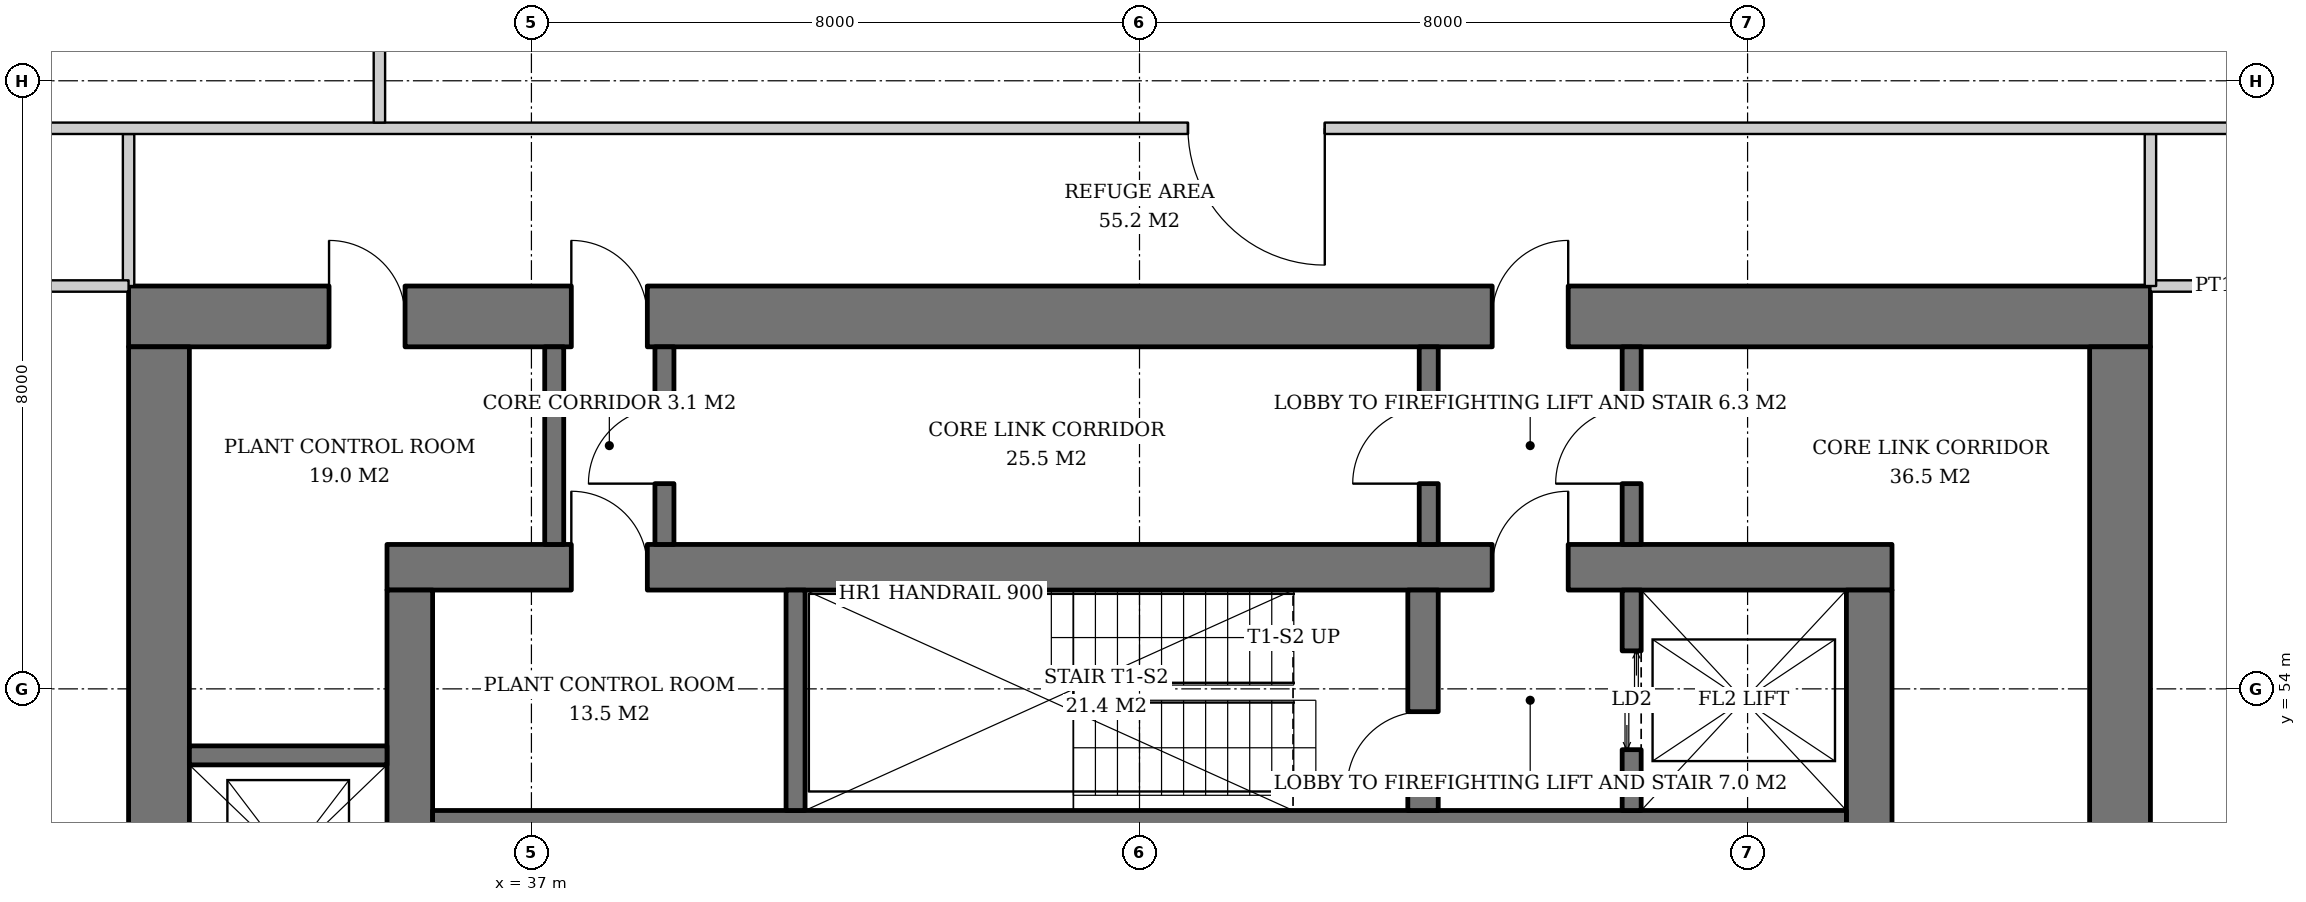
"""IFC4 building model, lengths in metres.
Left out: names, types, materials, properties, quantities, classifications, styles, units other than length and angle.
Written with IfcOpenShell. Run it as: python <this file> out.ifc"""

import sys

from ifc_helpers import new_model, si_unit, direction, frame, frame_2d, origin, place, context, subcontext, project, spatial, rectangle, extrude, element, fill, save


model = new_model("IFC4")
c1 = context("Model", 3, precision=1e-05, world=origin(), true_north=direction((0.0, 1.0)))
c2 = subcontext(c1, "Body", "Model", "MODEL_VIEW")
j1 = project(units=[si_unit("LENGTHUNIT", "METRE"), si_unit("PLANEANGLEUNIT", "RADIAN")], contexts=[c1])
p1 = place(None, origin())
s1 = spatial("IfcSite", under=j1, at=p1, CompositionType="ELEMENT")
p2 = place(p1, origin())
s2 = spatial("IfcBuilding", under=s1, at=p2, CompositionType="ELEMENT")
p3 = place(p2, frame((0.0, 0.0, 85.6)))
s3 = spatial("IfcBuildingStorey", under=s2, at=p3, CompositionType="ELEMENT", Elevation=85.6)
p4 = place(p3, frame((35.1, 55.6, 0.0), z_axis=(0.0, 0.0, 1.0), x_axis=(1.0, 0.0, 0.0)))
e1 = element("IfcWall", 1, at=p4, inside=s3, PredefinedType="SHEAR", context=c2, shape_type="SweptSolid", body=[
    extrude(rectangle(XDim=19.8, YDim=0.6, at=frame_2d((9.9, 0.0))), origin(), (0.0, 0.0, 1.0), 3.8),
])
p5 = place(p4, frame((14.54, 0.0, 0.0)))
e2 = element("IfcOpeningElement", 2, at=p5, cuts=e1, PredefinedType="OPENING", context=c2, shape_type="SweptSolid", body=[
    extrude(rectangle(XDim=1.0, YDim=2.1, at=frame_2d((0.5, 1.05))), frame((0.0, 0.31, 0.0), z_axis=(0.0, -1.0, 0.0), x_axis=(1.0, 0.0, 0.0)), (0.0, 0.0, 1.0), 0.62),
])
p6 = place(p4, frame((2.425, 0.0, 0.0)))
e3 = element("IfcOpeningElement", 3, at=p6, cuts=e1, PredefinedType="OPENING", context=c2, shape_type="SweptSolid", body=[
    extrude(rectangle(XDim=1.0, YDim=2.1, at=frame_2d((0.5, 1.05))), frame((0.0, 0.31, 0.0), z_axis=(0.0, -1.0, 0.0), x_axis=(1.0, 0.0, 0.0)), (0.0, 0.0, 1.0), 0.62),
])
p7 = place(p3, frame((35.4, 36.7, 0.0), z_axis=(0.0, 0.0, 1.0), x_axis=(0.0, 1.0, 0.0)))
e4 = element("IfcWall", 4, at=p7, inside=s3, PredefinedType="SHEAR", context=c2, shape_type="SweptSolid", body=[
    extrude(rectangle(XDim=18.6, YDim=0.6, at=frame_2d((9.3, 0.0))), origin(), (0.0, 0.0, 1.0), 3.8),
])
p8 = place(p7, frame((8.4, 0.0, 0.0)))
e5 = element("IfcOpeningElement", 5, at=p8, cuts=e4, PredefinedType="OPENING", context=c2, shape_type="SweptSolid", body=[
    extrude(rectangle(XDim=1.8, YDim=2.4, at=frame_2d((0.9, 1.2))), frame((0.0, 0.31, 0.0), z_axis=(0.0, -1.0, 0.0), x_axis=(1.0, 0.0, 0.0)), (0.0, 0.0, 1.0), 0.62),
])
p9 = place(p3, frame((54.6, 36.7, 0.0), z_axis=(0.0, 0.0, 1.0), x_axis=(0.0, 1.0, 0.0)))
e6 = element("IfcWall", 6, at=p9, inside=s3, PredefinedType="SHEAR", context=c2, shape_type="SweptSolid", body=[
    extrude(rectangle(XDim=18.6, YDim=0.6, at=frame_2d((9.3, 0.0))), origin(), (0.0, 0.0, 1.0), 3.8),
])
p10 = place(p9, frame((8.4, 0.0, 0.0)))
e7 = element("IfcOpeningElement", 7, at=p10, cuts=e6, PredefinedType="OPENING", context=c2, shape_type="SweptSolid", body=[
    extrude(rectangle(XDim=1.8, YDim=2.4, at=frame_2d((0.9, 1.2))), frame((0.0, 0.31, 0.0), z_axis=(0.0, -1.0, 0.0), x_axis=(1.0, 0.0, 0.0)), (0.0, 0.0, 1.0), 0.62),
])
p11 = place(p3, frame((31.7, 58.9, 0.0), z_axis=(0.0, 0.0, 1.0), x_axis=(1.0, 0.0, 0.0)))
e8 = element("IfcWall", 8, at=p11, inside=s3, PredefinedType="SHEAR", context=c2, shape_type="SweptSolid", body=[
    extrude(rectangle(XDim=26.6, YDim=0.8, at=frame_2d((13.3, 0.0))), origin(), (0.0, 0.0, 1.0), 3.8),
])
p12 = place(p11, frame((17.94, 0.0, 0.0)))
e9 = element("IfcOpeningElement", 9, at=p12, cuts=e8, PredefinedType="OPENING", context=c2, shape_type="SweptSolid", body=[
    extrude(rectangle(XDim=1.0, YDim=2.1, at=frame_2d((0.5, 1.05))), frame((0.0, 0.41, 0.0), z_axis=(0.0, -1.0, 0.0), x_axis=(1.0, 0.0, 0.0)), (0.0, 0.0, 1.0), 0.82),
])
p13 = place(p11, frame((5.825, 0.0, 0.0)))
e10 = element("IfcOpeningElement", 10, at=p13, cuts=e8, PredefinedType="OPENING", context=c2, shape_type="SweptSolid", body=[
    extrude(rectangle(XDim=1.0, YDim=2.1, at=frame_2d((0.5, 1.05))), frame((0.0, 0.41, 0.0), z_axis=(0.0, -1.0, 0.0), x_axis=(1.0, 0.0, 0.0)), (0.0, 0.0, 1.0), 0.82),
])
p14 = place(p11, frame((2.637, 0.0, 0.0)))
e11 = element("IfcOpeningElement", 11, at=p14, cuts=e8, PredefinedType="OPENING", context=c2, shape_type="SweptSolid", body=[
    extrude(rectangle(XDim=1.0, YDim=2.1, at=frame_2d((0.5, 1.05))), frame((0.0, 0.41, 0.0), z_axis=(0.0, -1.0, 0.0), x_axis=(1.0, 0.0, 0.0)), (0.0, 0.0, 1.0), 0.82),
])
p15 = place(p3, frame((32.1, 33.5, 0.0), z_axis=(0.0, 0.0, 1.0), x_axis=(0.0, 1.0, 0.0)))
e12 = element("IfcWall", 12, at=p15, inside=s3, PredefinedType="SHEAR", context=c2, shape_type="SweptSolid", body=[
    extrude(rectangle(XDim=25.0, YDim=0.8, at=frame_2d((12.5, 0.0))), origin(), (0.0, 0.0, 1.0), 3.8),
])
p16 = place(p15, frame((11.6, 0.0, 0.0)))
e13 = element("IfcOpeningElement", 13, at=p16, cuts=e12, PredefinedType="OPENING", context=c2, shape_type="SweptSolid", body=[
    extrude(rectangle(XDim=1.8, YDim=2.4, at=frame_2d((0.9, 1.2))), frame((0.0, 0.41, 0.0), z_axis=(0.0, -1.0, 0.0), x_axis=(1.0, 0.0, 0.0)), (0.0, 0.0, 1.0), 0.82),
])
p17 = place(p3, frame((57.9, 33.5, 0.0), z_axis=(0.0, 0.0, 1.0), x_axis=(0.0, 1.0, 0.0)))
e14 = element("IfcWall", 14, at=p17, inside=s3, PredefinedType="SHEAR", context=c2, shape_type="SweptSolid", body=[
    extrude(rectangle(XDim=25.0, YDim=0.8, at=frame_2d((12.5, 0.0))), origin(), (0.0, 0.0, 1.0), 3.8),
])
p18 = place(p17, frame((11.6, 0.0, 0.0)))
e15 = element("IfcOpeningElement", 15, at=p18, cuts=e14, PredefinedType="OPENING", context=c2, shape_type="SweptSolid", body=[
    extrude(rectangle(XDim=1.8, YDim=2.4, at=frame_2d((0.9, 1.2))), frame((0.0, 0.41, 0.0), z_axis=(0.0, -1.0, 0.0), x_axis=(1.0, 0.0, 0.0)), (0.0, 0.0, 1.0), 0.82),
])
p19 = place(p3, frame((35.7, 52.2, 0.0), z_axis=(0.0, 0.0, 1.0), x_axis=(1.0, 0.0, 0.0)))
e16 = element("IfcWall", 16, at=p19, inside=s3, PredefinedType="SHEAR", context=c2, shape_type="SweptSolid", body=[
    extrude(rectangle(XDim=18.6, YDim=0.4, at=frame_2d((9.3, 0.0))), origin(), (0.0, 0.0, 1.0), 3.8),
])
p20 = place(p3, frame((48.73, 52.4, 0.0), z_axis=(0.0, 0.0, 1.0), x_axis=(0.0, 1.0, 0.0)))
e17 = element("IfcWall", 17, at=p20, inside=s3, PredefinedType="SHEAR", context=c2, shape_type="SweptSolid", body=[
    extrude(rectangle(XDim=2.9, YDim=0.4, at=frame_2d((1.45, 0.0))), origin(), (0.0, 0.0, 1.0), 3.8),
])
p21 = place(p20, frame((0.3, 0.0, 0.0)))
e18 = element("IfcOpeningElement", 18, at=p21, cuts=e17, PredefinedType="OPENING", context=c2, shape_type="SweptSolid", body=[
    extrude(rectangle(XDim=1.0, YDim=2.1, at=frame_2d((0.5, 1.05))), frame((0.0, 0.21, 0.0), z_axis=(0.0, -1.0, 0.0), x_axis=(1.0, 0.0, 0.0)), (0.0, 0.0, 1.0), 0.42),
])
p22 = place(p3, frame((40.475, 52.4, 0.0), z_axis=(0.0, 0.0, 1.0), x_axis=(0.0, 1.0, 0.0)))
e19 = element("IfcWall", 19, at=p22, inside=s3, PredefinedType="SHEAR", context=c2, shape_type="SweptSolid", body=[
    extrude(rectangle(XDim=2.9, YDim=0.25, at=frame_2d((1.45, 0.0))), origin(), (0.0, 0.0, 1.0), 3.8),
])
p23 = place(p3, frame((51.475, 52.4, 0.0), z_axis=(0.0, 0.0, 1.0), x_axis=(0.0, 1.0, 0.0)))
e20 = element("IfcWall", 20, at=p23, inside=s3, PredefinedType="SHEAR", context=c2, shape_type="SweptSolid", body=[
    extrude(rectangle(XDim=2.9, YDim=0.25, at=frame_2d((1.45, 0.0))), origin(), (0.0, 0.0, 1.0), 3.8),
])
p24 = place(p23, frame((0.8, 0.0, 0.0)))
e21 = element("IfcOpeningElement", 21, at=p24, cuts=e20, PredefinedType="OPENING", context=c2, shape_type="SweptSolid", body=[
    extrude(rectangle(XDim=1.3, YDim=2.2, at=frame_2d((0.65, 1.1))), frame((0.0, 0.135, 0.0), z_axis=(0.0, -1.0, 0.0), x_axis=(1.0, 0.0, 0.0)), (0.0, 0.0, 1.0), 0.27),
])
p25 = place(p3, frame((32.5, 53.125, 0.0), z_axis=(0.0, 0.0, 1.0), x_axis=(1.0, 0.0, 0.0)))
e22 = element("IfcWall", 22, at=p25, inside=s3, PredefinedType="SHEAR", context=c2, shape_type="SweptSolid", body=[
    extrude(rectangle(XDim=2.6, YDim=0.25, at=frame_2d((1.3, 0.0))), origin(), (0.0, 0.0, 1.0), 3.8),
])
p26 = place(p3, frame((48.805, 55.9, 0.0), z_axis=(0.0, 0.0, 1.0), x_axis=(0.0, 1.0, 0.0)))
e23 = element("IfcWall", 23, at=p26, inside=s3, PredefinedType="SOLIDWALL", context=c2, shape_type="SweptSolid", body=[
    extrude(rectangle(XDim=2.6, YDim=0.25, at=frame_2d((1.3, 0.0))), origin(), (0.0, 0.0, 1.0), 3.6),
])
p27 = place(p26, frame((0.8, 0.0, 0.0)))
e24 = element("IfcOpeningElement", 24, at=p27, cuts=e23, PredefinedType="OPENING", context=c2, shape_type="SweptSolid", body=[
    extrude(rectangle(XDim=1.0, YDim=2.1, at=frame_2d((0.5, 1.05))), frame((0.0, 0.135, 0.0), z_axis=(0.0, -1.0, 0.0), x_axis=(1.0, 0.0, 0.0)), (0.0, 0.0, 1.0), 0.27),
])
p28 = place(p3, frame((51.475, 55.9, 0.0), z_axis=(0.0, 0.0, 1.0), x_axis=(0.0, 1.0, 0.0)))
e25 = element("IfcWall", 25, at=p28, inside=s3, PredefinedType="SOLIDWALL", context=c2, shape_type="SweptSolid", body=[
    extrude(rectangle(XDim=2.6, YDim=0.25, at=frame_2d((1.3, 0.0))), origin(), (0.0, 0.0, 1.0), 3.6),
])
p29 = place(p28, frame((0.8, 0.0, 0.0)))
e26 = element("IfcOpeningElement", 26, at=p29, cuts=e25, PredefinedType="OPENING", context=c2, shape_type="SweptSolid", body=[
    extrude(rectangle(XDim=1.0, YDim=2.1, at=frame_2d((0.5, 1.05))), frame((0.0, 0.135, 0.0), z_axis=(0.0, -1.0, 0.0), x_axis=(1.0, 0.0, 0.0)), (0.0, 0.0, 1.0), 0.27),
])
p30 = place(p3, frame((37.3, 55.9, 0.0), z_axis=(0.0, 0.0, 1.0), x_axis=(0.0, 1.0, 0.0)))
e27 = element("IfcWall", 27, at=p30, inside=s3, PredefinedType="SOLIDWALL", context=c2, shape_type="SweptSolid", body=[
    extrude(rectangle(XDim=2.6, YDim=0.25, at=frame_2d((1.3, 0.0))), origin(), (0.0, 0.0, 1.0), 3.6),
])
p31 = place(p3, frame((38.75, 55.9, 0.0), z_axis=(0.0, 0.0, 1.0), x_axis=(0.0, 1.0, 0.0)))
e28 = element("IfcWall", 28, at=p31, inside=s3, PredefinedType="SOLIDWALL", context=c2, shape_type="SweptSolid", body=[
    extrude(rectangle(XDim=2.6, YDim=0.25, at=frame_2d((1.3, 0.0))), origin(), (0.0, 0.0, 1.0), 3.6),
])
p32 = place(p31, frame((0.8, 0.0, 0.0)))
e29 = element("IfcOpeningElement", 29, at=p32, cuts=e28, PredefinedType="OPENING", context=c2, shape_type="SweptSolid", body=[
    extrude(rectangle(XDim=1.0, YDim=2.1, at=frame_2d((0.5, 1.05))), frame((0.0, 0.135, 0.0), z_axis=(0.0, -1.0, 0.0), x_axis=(1.0, 0.0, 0.0)), (0.0, 0.0, 1.0), 0.27),
])
for number, where, z_axis, x_axis in (
    (30, (58.3, 59.3, 0.0), (0.0, 0.0, 1.0), (1.0, 0.0, 0.0)),
    (31, (31.7, 59.3, 0.0), (0.0, 0.0, 1.0), (0.0, 1.0, 0.0)),
):
    element("IfcWall", number, at=place(p3, frame(where, z_axis=z_axis, x_axis=x_axis)), inside=s3, PredefinedType="PARTITIONING", context=c2, shape_type="SweptSolid", body=[
        extrude(rectangle(XDim=2.0, YDim=0.15, at=frame_2d((1.0, 0.0))), origin(), (0.0, 0.0, 1.0), 3.6),
    ])
p33 = place(p3, frame((58.3, 59.3, 0.0), z_axis=(0.0, 0.0, 1.0), x_axis=(0.0, 1.0, 0.0)))
e32 = element("IfcWall", 32, at=p33, inside=s3, PredefinedType="PARTITIONING", context=c2, shape_type="SweptSolid", body=[
    extrude(rectangle(XDim=2.0, YDim=0.15, at=frame_2d((1.0, 0.0))), origin(), (0.0, 0.0, 1.0), 2.592),
])
p34 = place(p3, frame((60.45, 61.375, 0.0), z_axis=(0.0, 0.0, 1.0), x_axis=(-1.0, 0.0, 0.0)))
e33 = element("IfcWall", 33, at=p34, inside=s3, PredefinedType="PARTITIONING", context=c2, shape_type="SweptSolid", body=[
    extrude(rectangle(XDim=30.75, YDim=0.15, at=frame_2d((15.375, 0.0))), origin(), (0.0, 0.0, 1.0), 2.592),
])
p35 = place(p34, frame((13.012, 0.0, 0.0)))
e34 = element("IfcOpeningElement", 34, at=p35, cuts=e33, PredefinedType="OPENING", context=c2, shape_type="SweptSolid", body=[
    extrude(rectangle(XDim=1.8, YDim=2.4, at=frame_2d((0.9, 1.2))), frame((0.0, 0.085, 0.0), z_axis=(0.0, -1.0, 0.0), x_axis=(1.0, 0.0, 0.0)), (0.0, 0.0, 1.0), 0.17),
])
p36 = place(p3, frame((35.0, 61.45, 0.0), z_axis=(0.0, 0.0, 1.0), x_axis=(0.0, 1.0, 0.0)))
e35 = element("IfcWall", 35, at=p36, inside=s3, PredefinedType="PARTITIONING", context=c2, shape_type="SweptSolid", body=[
    extrude(rectangle(XDim=5.798, YDim=0.15, at=frame_2d((2.899, 0.0))), origin(), (0.0, 0.0, 1.0), 3.6),
])
p37 = place(p3, frame((31.7, 59.3, 0.0), z_axis=(0.0, 0.0, 1.0), x_axis=(-1.0, 0.0, 0.0)))
e36 = element("IfcWall", 36, at=p37, inside=s3, PredefinedType="PARTITIONING", context=c2, shape_type="SweptSolid", body=[
    extrude(rectangle(XDim=2.0, YDim=0.15, at=frame_2d((1.0, 0.0))), origin(), (0.0, 0.0, 1.0), 2.592),
])
p38 = place(p24, origin())
e37 = element("IfcDoor", 37, at=p38, inside=s3, OperationType="DOUBLE_DOOR_SLIDING", PredefinedType="DOOR", context=c2, shape_type="SweptSolid", body=[
    extrude(rectangle(XDim=1.3, YDim=2.2, at=frame_2d((0.65, 1.1))), frame((0.0, 0.025, 0.0), z_axis=(0.0, -1.0, 0.0), x_axis=(1.0, 0.0, 0.0)), (0.0, 0.0, 1.0), 0.05),
])
fill(e21, e37)
p39 = place(p27, origin())
e38 = element("IfcDoor", 38, at=p39, inside=s3, OperationType="SINGLE_SWING_LEFT", PredefinedType="DOOR", context=c2, shape_type="SweptSolid", body=[
    extrude(rectangle(XDim=1.0, YDim=2.1, at=frame_2d((0.5, 1.05))), frame((0.0, 0.025, 0.0), z_axis=(0.0, -1.0, 0.0), x_axis=(1.0, 0.0, 0.0)), (0.0, 0.0, 1.0), 0.05),
])
fill(e24, e38)
p40 = place(p29, origin())
e39 = element("IfcDoor", 39, at=p40, inside=s3, OperationType="SINGLE_SWING_LEFT", PredefinedType="DOOR", context=c2, shape_type="SweptSolid", body=[
    extrude(rectangle(XDim=1.0, YDim=2.1, at=frame_2d((0.5, 1.05))), frame((0.0, 0.025, 0.0), z_axis=(0.0, -1.0, 0.0), x_axis=(1.0, 0.0, 0.0)), (0.0, 0.0, 1.0), 0.05),
])
fill(e26, e39)
p41 = place(p32, origin())
e40 = element("IfcDoor", 40, at=p41, inside=s3, OperationType="SINGLE_SWING_LEFT", PredefinedType="DOOR", context=c2, shape_type="SweptSolid", body=[
    extrude(rectangle(XDim=1.0, YDim=2.1, at=frame_2d((0.5, 1.05))), frame((0.0, 0.025, 0.0), z_axis=(0.0, -1.0, 0.0), x_axis=(1.0, 0.0, 0.0)), (0.0, 0.0, 1.0), 0.05),
])
fill(e29, e40)
p42 = place(p21, origin())
e41 = element("IfcDoor", 41, at=p42, inside=s3, OperationType="SINGLE_SWING_LEFT", PredefinedType="DOOR", context=c2, shape_type="SweptSolid", body=[
    extrude(rectangle(XDim=1.0, YDim=2.1, at=frame_2d((0.5, 1.05))), frame((0.0, 0.025, 0.0), z_axis=(0.0, -1.0, 0.0), x_axis=(1.0, 0.0, 0.0)), (0.0, 0.0, 1.0), 0.05),
])
fill(e18, e41)
p43 = place(p5, origin())
e42 = element("IfcDoor", 42, at=p43, inside=s3, OperationType="SINGLE_SWING_RIGHT", PredefinedType="DOOR", context=c2, shape_type="SweptSolid", body=[
    extrude(rectangle(XDim=1.0, YDim=2.1, at=frame_2d((0.5, 1.05))), frame((0.0, 0.025, 0.0), z_axis=(0.0, -1.0, 0.0), x_axis=(1.0, 0.0, 0.0)), (0.0, 0.0, 1.0), 0.05),
])
fill(e2, e42)
p44 = place(p12, origin())
e43 = element("IfcDoor", 43, at=p44, inside=s3, OperationType="SINGLE_SWING_RIGHT", PredefinedType="DOOR", context=c2, shape_type="SweptSolid", body=[
    extrude(rectangle(XDim=1.0, YDim=2.1, at=frame_2d((0.5, 1.05))), frame((0.0, 0.025, 0.0), z_axis=(0.0, -1.0, 0.0), x_axis=(1.0, 0.0, 0.0)), (0.0, 0.0, 1.0), 0.05),
])
fill(e9, e43)
p45 = place(p13, origin())
e44 = element("IfcDoor", 44, at=p45, inside=s3, OperationType="SINGLE_SWING_LEFT", PredefinedType="DOOR", context=c2, shape_type="SweptSolid", body=[
    extrude(rectangle(XDim=1.0, YDim=2.1, at=frame_2d((0.5, 1.05))), frame((0.0, 0.025, 0.0), z_axis=(0.0, -1.0, 0.0), x_axis=(1.0, 0.0, 0.0)), (0.0, 0.0, 1.0), 0.05),
])
fill(e10, e44)
p46 = place(p6, origin())
e45 = element("IfcDoor", 45, at=p46, inside=s3, OperationType="SINGLE_SWING_LEFT", PredefinedType="DOOR", context=c2, shape_type="SweptSolid", body=[
    extrude(rectangle(XDim=1.0, YDim=2.1, at=frame_2d((0.5, 1.05))), frame((0.0, -0.24, 0.0), z_axis=(0.0, -1.0, 0.0), x_axis=(1.0, 0.0, 0.0)), (0.0, 0.0, 1.0), 0.05),
])
fill(e3, e45)
p47 = place(p14, origin())
e46 = element("IfcDoor", 46, at=p47, inside=s3, OperationType="SINGLE_SWING_LEFT", PredefinedType="DOOR", context=c2, shape_type="SweptSolid", body=[
    extrude(rectangle(XDim=1.0, YDim=2.1, at=frame_2d((0.5, 1.05))), frame((0.0, -0.34, 0.0), z_axis=(0.0, -1.0, 0.0), x_axis=(1.0, 0.0, 0.0)), (0.0, 0.0, 1.0), 0.05),
])
fill(e11, e46)
p48 = place(p35, origin())
e47 = element("IfcDoor", 47, at=p48, inside=s3, OperationType="DOUBLE_DOOR_SINGLE_SWING", PredefinedType="DOOR", context=c2, shape_type="SweptSolid", body=[
    extrude(rectangle(XDim=1.8, YDim=2.4, at=frame_2d((0.9, 1.2))), frame((0.0, 0.025, 0.0), z_axis=(0.0, -1.0, 0.0), x_axis=(1.0, 0.0, 0.0)), (0.0, 0.0, 1.0), 0.05),
])
fill(e34, e47)
save(model, sys.argv[1])
